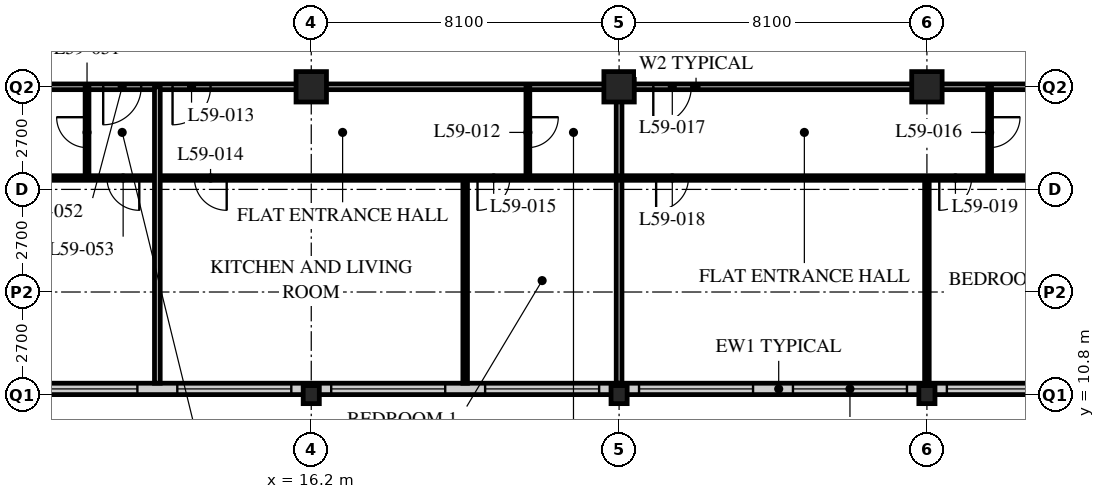
"""IFC4 building model, lengths in metres.
Left out: names, types, materials, properties, quantities, classifications, styles, units other than length and angle.
Written with IfcOpenShell. Run it as: python <this file> out.ifc"""

import sys

from ifc_helpers import new_model, si_unit, direction, frame, frame_2d, origin, origin_2d, place, context, subcontext, project, spatial, rectangle, hollow_rectangle, i_section, extrude, element, fill, save


model = new_model("IFC4")
c1 = context("Model", 3, precision=1e-05, world=origin(), true_north=direction((0.0, 1.0)))
c2 = subcontext(c1, "Body", "Model", "MODEL_VIEW")
j1 = project(units=[si_unit("LENGTHUNIT", "METRE"), si_unit("PLANEANGLEUNIT", "RADIAN")], contexts=[c1])
p1 = place(None, origin())
s1 = spatial("IfcSite", under=j1, at=p1, CompositionType="ELEMENT")
p2 = place(p1, origin())
s2 = spatial("IfcBuilding", under=s1, at=p2, CompositionType="ELEMENT")
p3 = place(p2, frame((0.0, 0.0, 228.0)))
s3 = spatial("IfcBuildingStorey", under=s2, at=p3, CompositionType="ELEMENT", Elevation=228.0)
p4 = place(p3, frame((16.2, 10.8, 0.0), z_axis=(0.0, 0.0, 1.0), x_axis=(1.0, 0.0, 0.0)))
e1 = element("IfcColumn", 1, at=p4, inside=s3, PredefinedType="COLUMN", context=c2, shape_type="SweptSolid", body=[
    extrude(i_section(OverallWidth=0.424, OverallDepth=0.475, WebThickness=0.048, FlangeThickness=0.077, FilletRadius=0.015, at=origin_2d()), origin(), (0.0, 0.0, 1.0), 3.6),
])
p5 = place(p3, frame((16.2, 18.9, 0.0), z_axis=(0.0, 0.0, 1.0), x_axis=(1.0, 0.0, 0.0)))
e2 = element("IfcColumn", 2, at=p5, inside=s3, PredefinedType="COLUMN", context=c2, shape_type="SweptSolid", body=[
    extrude(hollow_rectangle(XDim=0.8, YDim=0.8, WallThickness=0.08, at=origin_2d()), origin(), (0.0, 0.0, 1.0), 3.6),
])
p6 = place(p3, frame((24.3, 10.8, 0.0), z_axis=(0.0, 0.0, 1.0), x_axis=(1.0, 0.0, 0.0)))
e3 = element("IfcColumn", 3, at=p6, inside=s3, PredefinedType="COLUMN", context=c2, shape_type="SweptSolid", body=[
    extrude(i_section(OverallWidth=0.424, OverallDepth=0.475, WebThickness=0.048, FlangeThickness=0.077, FilletRadius=0.015, at=origin_2d()), origin(), (0.0, 0.0, 1.0), 3.6),
])
p7 = place(p3, frame((24.3, 18.9, 0.0), z_axis=(0.0, 0.0, 1.0), x_axis=(1.0, 0.0, 0.0)))
e4 = element("IfcColumn", 4, at=p7, inside=s3, PredefinedType="COLUMN", context=c2, shape_type="SweptSolid", body=[
    extrude(hollow_rectangle(XDim=0.8, YDim=0.8, WallThickness=0.08, at=origin_2d()), origin(), (0.0, 0.0, 1.0), 3.6),
])
p8 = place(p3, frame((32.4, 10.8, 0.0), z_axis=(0.0, 0.0, 1.0), x_axis=(1.0, 0.0, 0.0)))
e5 = element("IfcColumn", 5, at=p8, inside=s3, PredefinedType="COLUMN", context=c2, shape_type="SweptSolid", body=[
    extrude(i_section(OverallWidth=0.424, OverallDepth=0.475, WebThickness=0.048, FlangeThickness=0.077, FilletRadius=0.015, at=origin_2d()), origin(), (0.0, 0.0, 1.0), 3.6),
])
p9 = place(p3, frame((32.4, 18.9, 0.0), z_axis=(0.0, 0.0, 1.0), x_axis=(1.0, 0.0, 0.0)))
e6 = element("IfcColumn", 6, at=p9, inside=s3, PredefinedType="COLUMN", context=c2, shape_type="SweptSolid", body=[
    extrude(hollow_rectangle(XDim=0.8, YDim=0.8, WallThickness=0.08, at=origin_2d()), origin(), (0.0, 0.0, 1.0), 3.6),
])
p10 = place(p3, frame((8.4, 10.95, 0.0), z_axis=(0.0, 0.0, 1.0), x_axis=(1.0, 0.0, 0.0)))
e7 = element("IfcWall", 7, at=p10, inside=s3, PredefinedType="SOLIDWALL", context=c2, shape_type="SweptSolid", body=[
    extrude(rectangle(XDim=40.2, YDim=0.3, at=frame_2d((20.1, 0.0))), origin(), (0.0, 0.0, 1.0), 3.39),
])
p11 = place(p10, frame((0.225, 0.0, 0.6)))
e8 = element("IfcOpeningElement", 8, at=p11, cuts=e7, PredefinedType="OPENING", context=c2, shape_type="SweptSolid", body=[
    extrude(rectangle(XDim=3.0, YDim=2.0, at=frame_2d((1.5, 1.0))), frame((0.0, 0.16, 0.0), z_axis=(0.0, -1.0, 0.0), x_axis=(1.0, 0.0, 0.0)), (0.0, 0.0, 1.0), 0.32),
])
p12 = place(p10, frame((4.275, 0.0, 0.6)))
e9 = element("IfcOpeningElement", 9, at=p12, cuts=e7, PredefinedType="OPENING", context=c2, shape_type="SweptSolid", body=[
    extrude(rectangle(XDim=3.0, YDim=2.0, at=frame_2d((1.5, 1.0))), frame((0.0, 0.16, 0.0), z_axis=(0.0, -1.0, 0.0), x_axis=(1.0, 0.0, 0.0)), (0.0, 0.0, 1.0), 0.32),
])
p13 = place(p10, frame((8.325, 0.0, 0.6)))
e10 = element("IfcOpeningElement", 10, at=p13, cuts=e7, PredefinedType="OPENING", context=c2, shape_type="SweptSolid", body=[
    extrude(rectangle(XDim=3.0, YDim=2.0, at=frame_2d((1.5, 1.0))), frame((0.0, 0.16, 0.0), z_axis=(0.0, -1.0, 0.0), x_axis=(1.0, 0.0, 0.0)), (0.0, 0.0, 1.0), 0.32),
])
p14 = place(p10, frame((12.375, 0.0, 0.6)))
e11 = element("IfcOpeningElement", 11, at=p14, cuts=e7, PredefinedType="OPENING", context=c2, shape_type="SweptSolid", body=[
    extrude(rectangle(XDim=3.0, YDim=2.0, at=frame_2d((1.5, 1.0))), frame((0.0, 0.16, 0.0), z_axis=(0.0, -1.0, 0.0), x_axis=(1.0, 0.0, 0.0)), (0.0, 0.0, 1.0), 0.32),
])
p15 = place(p10, frame((16.425, 0.0, 0.6)))
e12 = element("IfcOpeningElement", 12, at=p15, cuts=e7, PredefinedType="OPENING", context=c2, shape_type="SweptSolid", body=[
    extrude(rectangle(XDim=3.0, YDim=2.0, at=frame_2d((1.5, 1.0))), frame((0.0, 0.16, 0.0), z_axis=(0.0, -1.0, 0.0), x_axis=(1.0, 0.0, 0.0)), (0.0, 0.0, 1.0), 0.32),
])
p16 = place(p10, frame((20.475, 0.0, 0.6)))
e13 = element("IfcOpeningElement", 13, at=p16, cuts=e7, PredefinedType="OPENING", context=c2, shape_type="SweptSolid", body=[
    extrude(rectangle(XDim=3.0, YDim=2.0, at=frame_2d((1.5, 1.0))), frame((0.0, 0.16, 0.0), z_axis=(0.0, -1.0, 0.0), x_axis=(1.0, 0.0, 0.0)), (0.0, 0.0, 1.0), 0.32),
])
p17 = place(p10, frame((24.525, 0.0, 0.6)))
e14 = element("IfcOpeningElement", 14, at=p17, cuts=e7, PredefinedType="OPENING", context=c2, shape_type="SweptSolid", body=[
    extrude(rectangle(XDim=3.0, YDim=2.0, at=frame_2d((1.5, 1.0))), frame((0.0, 0.16, 0.0), z_axis=(0.0, -1.0, 0.0), x_axis=(1.0, 0.0, 0.0)), (0.0, 0.0, 1.0), 0.32),
])
p18 = place(p10, frame((28.575, 0.0, 0.6)))
e15 = element("IfcOpeningElement", 15, at=p18, cuts=e7, PredefinedType="OPENING", context=c2, shape_type="SweptSolid", body=[
    extrude(rectangle(XDim=3.0, YDim=2.0, at=frame_2d((1.5, 1.0))), frame((0.0, 0.16, 0.0), z_axis=(0.0, -1.0, 0.0), x_axis=(1.0, 0.0, 0.0)), (0.0, 0.0, 1.0), 0.32),
])
p19 = place(p10, frame((32.625, 0.0, 0.6)))
e16 = element("IfcOpeningElement", 16, at=p19, cuts=e7, PredefinedType="OPENING", context=c2, shape_type="SweptSolid", body=[
    extrude(rectangle(XDim=3.0, YDim=2.0, at=frame_2d((1.5, 1.0))), frame((0.0, 0.16, 0.0), z_axis=(0.0, -1.0, 0.0), x_axis=(1.0, 0.0, 0.0)), (0.0, 0.0, 1.0), 0.32),
])
p20 = place(p10, frame((36.675, 0.0, 0.6)))
e17 = element("IfcOpeningElement", 17, at=p20, cuts=e7, PredefinedType="OPENING", context=c2, shape_type="SweptSolid", body=[
    extrude(rectangle(XDim=3.0, YDim=2.0, at=frame_2d((1.5, 1.0))), frame((0.0, 0.16, 0.0), z_axis=(0.0, -1.0, 0.0), x_axis=(1.0, 0.0, 0.0)), (0.0, 0.0, 1.0), 0.32),
])
p21 = place(p3, frame((8.1, 18.9, 0.0), z_axis=(0.0, 0.0, 1.0), x_axis=(1.0, 0.0, 0.0)))
e18 = element("IfcWall", 18, at=p21, inside=s3, PredefinedType="PARTITIONING", context=c2, shape_type="SweptSolid", body=[
    extrude(rectangle(XDim=36.45, YDim=0.15, at=frame_2d((18.225, 0.0))), origin(), (0.0, 0.0, 1.0), 2.628),
])
p22 = place(p21, frame((4.45, 0.0, 0.0)))
e19 = element("IfcOpeningElement", 19, at=p22, cuts=e18, PredefinedType="OPENING", context=c2, shape_type="SweptSolid", body=[
    extrude(rectangle(XDim=1.0, YDim=2.1, at=frame_2d((0.5, 1.05))), frame((0.0, 0.085, 0.0), z_axis=(0.0, -1.0, 0.0), x_axis=(1.0, 0.0, 0.0)), (0.0, 0.0, 1.0), 0.17),
])
p23 = place(p21, frame((17.1, 0.0, 0.0)))
e20 = element("IfcOpeningElement", 20, at=p23, cuts=e18, PredefinedType="OPENING", context=c2, shape_type="SweptSolid", body=[
    extrude(rectangle(XDim=1.0, YDim=2.1, at=frame_2d((0.5, 1.05))), frame((0.0, 0.085, 0.0), z_axis=(0.0, -1.0, 0.0), x_axis=(1.0, 0.0, 0.0)), (0.0, 0.0, 1.0), 0.17),
])
p24 = place(p21, frame((29.05, 0.0, 0.0)))
e21 = element("IfcOpeningElement", 21, at=p24, cuts=e18, PredefinedType="OPENING", context=c2, shape_type="SweptSolid", body=[
    extrude(rectangle(XDim=1.0, YDim=2.1, at=frame_2d((0.5, 1.05))), frame((0.0, 0.085, 0.0), z_axis=(0.0, -1.0, 0.0), x_axis=(1.0, 0.0, 0.0)), (0.0, 0.0, 1.0), 0.17),
])
p25 = place(p21, frame((2.625, 0.0, 0.0)))
e22 = element("IfcOpeningElement", 22, at=p25, cuts=e18, PredefinedType="OPENING", context=c2, shape_type="SweptSolid", body=[
    extrude(rectangle(XDim=1.0, YDim=2.1, at=frame_2d((0.5, 1.05))), frame((0.0, 0.085, 0.0), z_axis=(0.0, -1.0, 0.0), x_axis=(1.0, 0.0, 0.0)), (0.0, 0.0, 1.0), 0.17),
])
p26 = place(p21, frame((33.925, 0.0, 0.0)))
e23 = element("IfcOpeningElement", 23, at=p26, cuts=e18, PredefinedType="OPENING", context=c2, shape_type="SweptSolid", body=[
    extrude(rectangle(XDim=1.0, YDim=2.1, at=frame_2d((0.5, 1.05))), frame((0.0, 0.085, 0.0), z_axis=(0.0, -1.0, 0.0), x_axis=(1.0, 0.0, 0.0)), (0.0, 0.0, 1.0), 0.17),
])
p27 = place(p3, frame((21.9, 18.9, 0.0), z_axis=(0.0, 0.0, 1.0), x_axis=(0.0, -1.0, 0.0)))
e24 = element("IfcWall", 24, at=p27, inside=s3, PredefinedType="PARTITIONING", context=c2, shape_type="SweptSolid", body=[
    extrude(rectangle(XDim=2.4, YDim=0.1, at=frame_2d((1.2, 0.0))), origin(), (0.0, 0.0, 1.0), 3.39),
])
p28 = place(p27, frame((0.8, 0.0, 0.0)))
e25 = element("IfcOpeningElement", 25, at=p28, cuts=e24, PredefinedType="OPENING", context=c2, shape_type="SweptSolid", body=[
    extrude(rectangle(XDim=0.8, YDim=2.1, at=frame_2d((0.4, 1.05))), frame((0.0, 0.06, 0.0), z_axis=(0.0, -1.0, 0.0), x_axis=(1.0, 0.0, 0.0)), (0.0, 0.0, 1.0), 0.12),
])
p29 = place(p3, frame((20.25, 16.5, 0.0), z_axis=(0.0, 0.0, 1.0), x_axis=(0.0, -1.0, 0.0)))
e26 = element("IfcWall", 26, at=p29, inside=s3, PredefinedType="PARTITIONING", context=c2, shape_type="SweptSolid", body=[
    extrude(rectangle(XDim=5.4, YDim=0.12, at=frame_2d((2.7, 0.0))), origin(), (0.0, 0.0, 1.0), 3.39),
])
p30 = place(p3, frame((24.3, 18.9, 0.0), z_axis=(0.0, 0.0, 1.0), x_axis=(0.0, -1.0, 0.0)))
e27 = element("IfcWall", 27, at=p30, inside=s3, PredefinedType="PARTITIONING", context=c2, shape_type="SweptSolid", body=[
    extrude(rectangle(XDim=7.8, YDim=0.15, at=frame_2d((3.9, 0.0))), origin(), (0.0, 0.0, 1.0), 2.628),
])
p31 = place(p3, frame((34.05, 18.9, 0.0), z_axis=(0.0, 0.0, 1.0), x_axis=(0.0, -1.0, 0.0)))
e28 = element("IfcWall", 28, at=p31, inside=s3, PredefinedType="PARTITIONING", context=c2, shape_type="SweptSolid", body=[
    extrude(rectangle(XDim=2.4, YDim=0.1, at=frame_2d((1.2, 0.0))), origin(), (0.0, 0.0, 1.0), 3.39),
])
p32 = place(p31, frame((0.8, 0.0, 0.0)))
e29 = element("IfcOpeningElement", 29, at=p32, cuts=e28, PredefinedType="OPENING", context=c2, shape_type="SweptSolid", body=[
    extrude(rectangle(XDim=0.8, YDim=2.1, at=frame_2d((0.4, 1.05))), frame((0.0, 0.06, 0.0), z_axis=(0.0, -1.0, 0.0), x_axis=(1.0, 0.0, 0.0)), (0.0, 0.0, 1.0), 0.12),
])
p33 = place(p3, frame((32.4, 16.5, 0.0), z_axis=(0.0, 0.0, 1.0), x_axis=(0.0, -1.0, 0.0)))
e30 = element("IfcWall", 30, at=p33, inside=s3, PredefinedType="PARTITIONING", context=c2, shape_type="SweptSolid", body=[
    extrude(rectangle(XDim=5.4, YDim=0.12, at=frame_2d((2.7, 0.0))), origin(), (0.0, 0.0, 1.0), 2.628),
])
p34 = place(p3, frame((8.1, 16.5, 0.0), z_axis=(0.0, 0.0, 1.0), x_axis=(1.0, 0.0, 0.0)))
e31 = element("IfcWall", 31, at=p34, inside=s3, PredefinedType="PARTITIONING", context=c2, shape_type="SweptSolid", body=[
    extrude(rectangle(XDim=28.35, YDim=0.12, at=frame_2d((14.175, 0.0))), origin(), (0.0, 0.0, 1.0), 3.39),
])
p35 = place(p34, frame((5.025, 0.0, 0.0)))
e32 = element("IfcOpeningElement", 32, at=p35, cuts=e31, PredefinedType="OPENING", context=c2, shape_type="SweptSolid", body=[
    extrude(rectangle(XDim=0.85, YDim=2.1, at=frame_2d((0.425, 1.05))), frame((0.0, 0.07, 0.0), z_axis=(0.0, -1.0, 0.0), x_axis=(1.0, 0.0, 0.0)), (0.0, 0.0, 1.0), 0.14),
])
p36 = place(p34, frame((12.475, 0.0, 0.0)))
e33 = element("IfcOpeningElement", 33, at=p36, cuts=e31, PredefinedType="OPENING", context=c2, shape_type="SweptSolid", body=[
    extrude(rectangle(XDim=0.85, YDim=2.1, at=frame_2d((0.425, 1.05))), frame((0.0, 0.07, 0.0), z_axis=(0.0, -1.0, 0.0), x_axis=(1.0, 0.0, 0.0)), (0.0, 0.0, 1.0), 0.14),
])
p37 = place(p34, frame((17.175, 0.0, 0.0)))
e34 = element("IfcOpeningElement", 34, at=p37, cuts=e31, PredefinedType="OPENING", context=c2, shape_type="SweptSolid", body=[
    extrude(rectangle(XDim=0.85, YDim=2.1, at=frame_2d((0.425, 1.05))), frame((0.0, 0.07, 0.0), z_axis=(0.0, -1.0, 0.0), x_axis=(1.0, 0.0, 0.0)), (0.0, 0.0, 1.0), 0.14),
])
p38 = place(p34, frame((24.625, 0.0, 0.0)))
e35 = element("IfcOpeningElement", 35, at=p38, cuts=e31, PredefinedType="OPENING", context=c2, shape_type="SweptSolid", body=[
    extrude(rectangle(XDim=0.85, YDim=2.1, at=frame_2d((0.425, 1.05))), frame((0.0, 0.07, 0.0), z_axis=(0.0, -1.0, 0.0), x_axis=(1.0, 0.0, 0.0)), (0.0, 0.0, 1.0), 0.14),
])
p39 = place(p34, frame((2.725, 0.0, 0.0)))
e36 = element("IfcOpeningElement", 36, at=p39, cuts=e31, PredefinedType="OPENING", context=c2, shape_type="SweptSolid", body=[
    extrude(rectangle(XDim=0.85, YDim=2.1, at=frame_2d((0.425, 1.05))), frame((0.0, 0.07, 0.0), z_axis=(0.0, -1.0, 0.0), x_axis=(1.0, 0.0, 0.0)), (0.0, 0.0, 1.0), 0.14),
])
p40 = place(p3, frame((10.3, 18.9, 0.0), z_axis=(0.0, 0.0, 1.0), x_axis=(0.0, -1.0, 0.0)))
e37 = element("IfcWall", 37, at=p40, inside=s3, PredefinedType="PARTITIONING", context=c2, shape_type="SweptSolid", body=[
    extrude(rectangle(XDim=2.4, YDim=0.1, at=frame_2d((1.2, 0.0))), origin(), (0.0, 0.0, 1.0), 3.39),
])
p41 = place(p40, frame((0.8, 0.0, 0.0)))
e38 = element("IfcOpeningElement", 38, at=p41, cuts=e37, PredefinedType="OPENING", context=c2, shape_type="SweptSolid", body=[
    extrude(rectangle(XDim=0.8, YDim=2.1, at=frame_2d((0.4, 1.05))), frame((0.0, 0.06, 0.0), z_axis=(0.0, -1.0, 0.0), x_axis=(1.0, 0.0, 0.0)), (0.0, 0.0, 1.0), 0.12),
])
p42 = place(p3, frame((12.15, 18.9, 0.0), z_axis=(0.0, 0.0, 1.0), x_axis=(0.0, -1.0, 0.0)))
e39 = element("IfcWall", 39, at=p42, inside=s3, PredefinedType="PARTITIONING", context=c2, shape_type="SweptSolid", body=[
    extrude(rectangle(XDim=7.8, YDim=0.15, at=frame_2d((3.9, 0.0))), origin(), (0.0, 0.0, 1.0), 3.39),
])
p43 = place(p11, origin())
e40 = element("IfcWindow", 40, at=p43, inside=s3, PartitioningType="SINGLE_PANEL", PredefinedType="WINDOW", context=c2, shape_type="SweptSolid", body=[
    extrude(rectangle(XDim=3.0, YDim=2.0, at=frame_2d((1.5, 1.0))), frame((0.0, 0.03, 0.0), z_axis=(0.0, -1.0, 0.0), x_axis=(1.0, 0.0, 0.0)), (0.0, 0.0, 1.0), 0.06),
])
fill(e8, e40)
p44 = place(p12, origin())
e41 = element("IfcWindow", 41, at=p44, inside=s3, PartitioningType="SINGLE_PANEL", PredefinedType="WINDOW", context=c2, shape_type="SweptSolid", body=[
    extrude(rectangle(XDim=3.0, YDim=2.0, at=frame_2d((1.5, 1.0))), frame((0.0, 0.03, 0.0), z_axis=(0.0, -1.0, 0.0), x_axis=(1.0, 0.0, 0.0)), (0.0, 0.0, 1.0), 0.06),
])
fill(e9, e41)
p45 = place(p13, origin())
e42 = element("IfcWindow", 42, at=p45, inside=s3, PartitioningType="SINGLE_PANEL", PredefinedType="WINDOW", context=c2, shape_type="SweptSolid", body=[
    extrude(rectangle(XDim=3.0, YDim=2.0, at=frame_2d((1.5, 1.0))), frame((0.0, 0.03, 0.0), z_axis=(0.0, -1.0, 0.0), x_axis=(1.0, 0.0, 0.0)), (0.0, 0.0, 1.0), 0.06),
])
fill(e10, e42)
p46 = place(p14, origin())
e43 = element("IfcWindow", 43, at=p46, inside=s3, PartitioningType="SINGLE_PANEL", PredefinedType="WINDOW", context=c2, shape_type="SweptSolid", body=[
    extrude(rectangle(XDim=3.0, YDim=2.0, at=frame_2d((1.5, 1.0))), frame((0.0, 0.03, 0.0), z_axis=(0.0, -1.0, 0.0), x_axis=(1.0, 0.0, 0.0)), (0.0, 0.0, 1.0), 0.06),
])
fill(e11, e43)
p47 = place(p15, origin())
e44 = element("IfcWindow", 44, at=p47, inside=s3, PartitioningType="SINGLE_PANEL", PredefinedType="WINDOW", context=c2, shape_type="SweptSolid", body=[
    extrude(rectangle(XDim=3.0, YDim=2.0, at=frame_2d((1.5, 1.0))), frame((0.0, 0.03, 0.0), z_axis=(0.0, -1.0, 0.0), x_axis=(1.0, 0.0, 0.0)), (0.0, 0.0, 1.0), 0.06),
])
fill(e12, e44)
p48 = place(p16, origin())
e45 = element("IfcWindow", 45, at=p48, inside=s3, PartitioningType="SINGLE_PANEL", PredefinedType="WINDOW", context=c2, shape_type="SweptSolid", body=[
    extrude(rectangle(XDim=3.0, YDim=2.0, at=frame_2d((1.5, 1.0))), frame((0.0, 0.03, 0.0), z_axis=(0.0, -1.0, 0.0), x_axis=(1.0, 0.0, 0.0)), (0.0, 0.0, 1.0), 0.06),
])
fill(e13, e45)
p49 = place(p17, origin())
e46 = element("IfcWindow", 46, at=p49, inside=s3, PartitioningType="SINGLE_PANEL", PredefinedType="WINDOW", context=c2, shape_type="SweptSolid", body=[
    extrude(rectangle(XDim=3.0, YDim=2.0, at=frame_2d((1.5, 1.0))), frame((0.0, 0.03, 0.0), z_axis=(0.0, -1.0, 0.0), x_axis=(1.0, 0.0, 0.0)), (0.0, 0.0, 1.0), 0.06),
])
fill(e14, e46)
p50 = place(p28, origin())
e47 = element("IfcDoor", 47, at=p50, inside=s3, OperationType="SINGLE_SWING_LEFT", PredefinedType="DOOR", context=c2, shape_type="SweptSolid", body=[
    extrude(rectangle(XDim=0.8, YDim=2.1, at=frame_2d((0.4, 1.05))), frame((0.0, 0.025, 0.0), z_axis=(0.0, -1.0, 0.0), x_axis=(1.0, 0.0, 0.0)), (0.0, 0.0, 1.0), 0.05),
])
fill(e25, e47)
p51 = place(p22, origin())
e48 = element("IfcDoor", 48, at=p51, inside=s3, OperationType="SINGLE_SWING_RIGHT", PredefinedType="DOOR", context=c2, shape_type="SweptSolid", body=[
    extrude(rectangle(XDim=1.0, YDim=2.1, at=frame_2d((0.5, 1.05))), frame((0.0, 0.025, 0.0), z_axis=(0.0, -1.0, 0.0), x_axis=(1.0, 0.0, 0.0)), (0.0, 0.0, 1.0), 0.05),
])
fill(e19, e48)
p52 = place(p35, origin())
e49 = element("IfcDoor", 49, at=p52, inside=s3, OperationType="SINGLE_SWING_LEFT", PredefinedType="DOOR", context=c2, shape_type="SweptSolid", body=[
    extrude(rectangle(XDim=0.85, YDim=2.1, at=frame_2d((0.425, 1.05))), frame((0.0, 0.025, 0.0), z_axis=(0.0, -1.0, 0.0), x_axis=(1.0, 0.0, 0.0)), (0.0, 0.0, 1.0), 0.05),
])
fill(e32, e49)
p53 = place(p36, origin())
e50 = element("IfcDoor", 50, at=p53, inside=s3, OperationType="SINGLE_SWING_RIGHT", PredefinedType="DOOR", context=c2, shape_type="SweptSolid", body=[
    extrude(rectangle(XDim=0.85, YDim=2.1, at=frame_2d((0.425, 1.05))), frame((0.0, 0.025, 0.0), z_axis=(0.0, -1.0, 0.0), x_axis=(1.0, 0.0, 0.0)), (0.0, 0.0, 1.0), 0.05),
])
fill(e33, e50)
p54 = place(p32, origin())
e51 = element("IfcDoor", 51, at=p54, inside=s3, OperationType="SINGLE_SWING_LEFT", PredefinedType="DOOR", context=c2, shape_type="SweptSolid", body=[
    extrude(rectangle(XDim=0.8, YDim=2.1, at=frame_2d((0.4, 1.05))), frame((0.0, 0.025, 0.0), z_axis=(0.0, -1.0, 0.0), x_axis=(1.0, 0.0, 0.0)), (0.0, 0.0, 1.0), 0.05),
])
fill(e29, e51)
p55 = place(p23, origin())
e52 = element("IfcDoor", 52, at=p55, inside=s3, OperationType="SINGLE_SWING_RIGHT", PredefinedType="DOOR", context=c2, shape_type="SweptSolid", body=[
    extrude(rectangle(XDim=1.0, YDim=2.1, at=frame_2d((0.5, 1.05))), frame((0.0, 0.025, 0.0), z_axis=(0.0, -1.0, 0.0), x_axis=(1.0, 0.0, 0.0)), (0.0, 0.0, 1.0), 0.05),
])
fill(e20, e52)
p56 = place(p37, origin())
e53 = element("IfcDoor", 53, at=p56, inside=s3, OperationType="SINGLE_SWING_RIGHT", PredefinedType="DOOR", context=c2, shape_type="SweptSolid", body=[
    extrude(rectangle(XDim=0.85, YDim=2.1, at=frame_2d((0.425, 1.05))), frame((0.0, 0.025, 0.0), z_axis=(0.0, -1.0, 0.0), x_axis=(1.0, 0.0, 0.0)), (0.0, 0.0, 1.0), 0.05),
])
fill(e34, e53)
p57 = place(p38, origin())
e54 = element("IfcDoor", 54, at=p57, inside=s3, OperationType="SINGLE_SWING_RIGHT", PredefinedType="DOOR", context=c2, shape_type="SweptSolid", body=[
    extrude(rectangle(XDim=0.85, YDim=2.1, at=frame_2d((0.425, 1.05))), frame((0.0, 0.025, 0.0), z_axis=(0.0, -1.0, 0.0), x_axis=(1.0, 0.0, 0.0)), (0.0, 0.0, 1.0), 0.05),
])
fill(e35, e54)
p58 = place(p41, origin())
e55 = element("IfcDoor", 55, at=p58, inside=s3, OperationType="SINGLE_SWING_RIGHT", PredefinedType="DOOR", context=c2, shape_type="SweptSolid", body=[
    extrude(rectangle(XDim=0.8, YDim=2.1, at=frame_2d((0.4, 1.05))), frame((0.0, 0.025, 0.0), z_axis=(0.0, -1.0, 0.0), x_axis=(1.0, 0.0, 0.0)), (0.0, 0.0, 1.0), 0.05),
])
fill(e38, e55)
p59 = place(p25, origin())
e56 = element("IfcDoor", 56, at=p59, inside=s3, OperationType="SINGLE_SWING_RIGHT", PredefinedType="DOOR", context=c2, shape_type="SweptSolid", body=[
    extrude(rectangle(XDim=1.0, YDim=2.1, at=frame_2d((0.5, 1.05))), frame((0.0, 0.025, 0.0), z_axis=(0.0, -1.0, 0.0), x_axis=(1.0, 0.0, 0.0)), (0.0, 0.0, 1.0), 0.05),
])
fill(e22, e56)
p60 = place(p39, origin())
e57 = element("IfcDoor", 57, at=p60, inside=s3, OperationType="SINGLE_SWING_LEFT", PredefinedType="DOOR", context=c2, shape_type="SweptSolid", body=[
    extrude(rectangle(XDim=0.85, YDim=2.1, at=frame_2d((0.425, 1.05))), frame((0.0, 0.025, 0.0), z_axis=(0.0, -1.0, 0.0), x_axis=(1.0, 0.0, 0.0)), (0.0, 0.0, 1.0), 0.05),
])
fill(e36, e57)
save(model, sys.argv[1])
